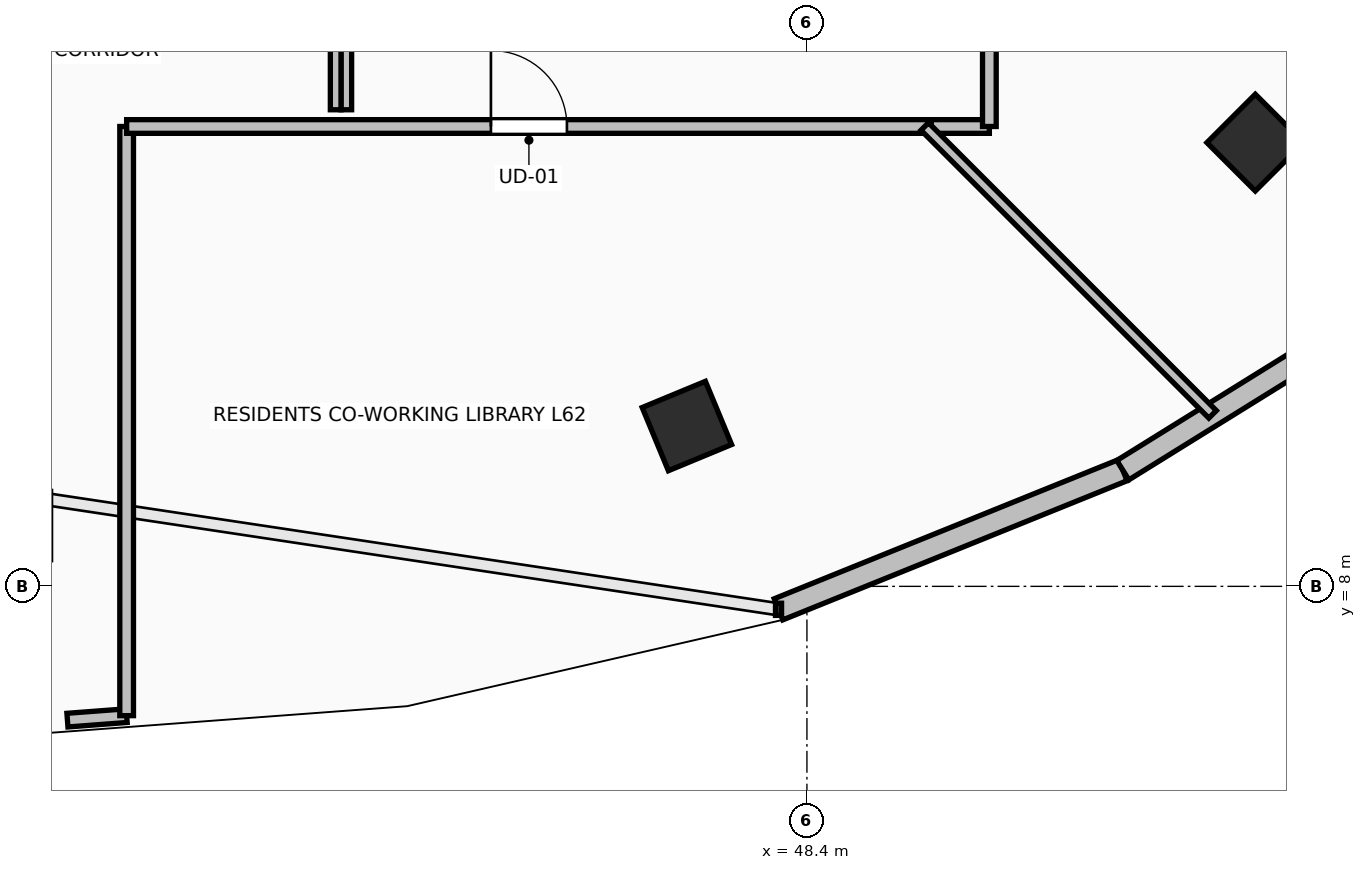
"""IFC4 building model, lengths in metres.
Left out: names, types, materials, properties, quantities, classifications, styles, units other than length and angle.
Written with IfcOpenShell. Run it as: python <this file> out.ifc"""

import sys

from ifc_helpers import new_model, si_unit, direction, frame, frame_2d, origin, origin_2d, place, context, subcontext, project, spatial, rectangle, extrude, element, fill, save


model = new_model("IFC4")
c1 = context("Model", 3, precision=1e-05, world=origin(), true_north=direction((0.0, 1.0)))
c2 = subcontext(c1, "Body", "Model", "MODEL_VIEW")
j1 = project(units=[si_unit("LENGTHUNIT", "METRE"), si_unit("PLANEANGLEUNIT", "RADIAN")], contexts=[c1])
p1 = place(None, origin())
s1 = spatial("IfcSite", under=j1, at=p1, CompositionType="ELEMENT")
p2 = place(p1, origin())
s2 = spatial("IfcBuilding", under=s1, at=p2, CompositionType="ELEMENT")
p3 = place(p2, frame((0.0, 0.0, 229.75)))
s3 = spatial("IfcBuildingStorey", under=s2, at=p3, CompositionType="ELEMENT", Elevation=229.75)
for number, where, z_axis, x_axis in (
    (1, (46.821, 10.109, 0.0), (0.0, 0.0, 1.0), (0.383, -0.924, 0.0)),
    (2, (54.299, 13.838, 0.0), (0.0, 0.0, 1.0), (0.707, -0.707, 0.0)),
):
    element("IfcColumn", number, at=place(p3, frame(where, z_axis=z_axis, x_axis=x_axis)), inside=s3, PredefinedType="COLUMN", context=c2, shape_type="SweptSolid", body=[
        extrude(rectangle(XDim=0.9, YDim=0.9, at=origin_2d()), origin(), (0.0, 0.0, 1.0), 4.5),
    ])
p4 = place(p3, frame((48.026, 7.698, 0.0), z_axis=(0.0, 0.0, 1.0), x_axis=(0.927147375511, 0.374696869594, 0.0)))
e3 = element("IfcWall", 3, at=p4, inside=s3, PredefinedType="STANDARD", context=c2, shape_type="SweptSolid", body=[
    extrude(rectangle(XDim=4.885, YDim=0.3, at=frame_2d((2.443, 0.0))), origin(), (0.0, 0.0, 1.0), 4.24),
])
p5 = place(p3, frame((52.556, 9.529, 0.0), z_axis=(0.0, 0.0, 1.0), x_axis=(0.849702323036, 0.527262707032, 0.0)))
e4 = element("IfcWall", 4, at=p5, inside=s3, PredefinedType="STANDARD", context=c2, shape_type="SweptSolid", body=[
    extrude(rectangle(XDim=4.672, YDim=0.3, at=frame_2d((2.336, 0.0))), origin(), (0.0, 0.0, 1.0), 4.24),
])
p6 = place(p3, frame((38.671, 6.24, 0.0), z_axis=(0.0, 0.0, 1.0), x_axis=(0.997136622012, 0.0756211415, 0.0)))
e5 = element("IfcWall", 5, at=p6, inside=s3, PredefinedType="PARTITIONING", context=c2, shape_type="SweptSolid", body=[
    extrude(rectangle(XDim=0.781, YDim=0.18, at=frame_2d((0.391, 0.0))), origin(), (0.0, 0.0, 1.0), 4.24),
])
p7 = place(p3, frame((39.45, 6.299, 0.0), z_axis=(0.0, 0.0, 1.0), x_axis=(0.0, 1.0, 0.0)))
e6 = element("IfcWall", 6, at=p7, inside=s3, PredefinedType="PARTITIONING", context=c2, shape_type="SweptSolid", body=[
    extrude(rectangle(XDim=7.751, YDim=0.18, at=frame_2d((3.875, 0.0))), origin(), (0.0, 0.0, 1.0), 3.432),
])
p8 = place(p3, frame((39.45, 14.05, 0.0), z_axis=(0.0, 0.0, 1.0), x_axis=(1.0, 0.0, 0.0)))
e7 = element("IfcWall", 7, at=p8, inside=s3, PredefinedType="PARTITIONING", context=c2, shape_type="SweptSolid", body=[
    extrude(rectangle(XDim=10.585, YDim=0.18, at=frame_2d((5.292, 0.0))), origin(), (0.0, 0.0, 1.0), 3.432),
])
p9 = place(p8, frame((4.792, 0.0, 0.0)))
e8 = element("IfcOpeningElement", 8, at=p9, cuts=e7, PredefinedType="OPENING", context=c2, shape_type="SweptSolid", body=[
    extrude(rectangle(XDim=1.0, YDim=2.15, at=frame_2d((0.5, 1.075))), frame((0.0, 0.105, 0.0), z_axis=(0.0, -1.0, 0.0), x_axis=(1.0, 0.0, 0.0)), (0.0, 0.0, 1.0), 0.21),
])
p10 = place(p3, frame((50.035, 14.05, 0.0), z_axis=(0.0, 0.0, 1.0), x_axis=(1.0, 0.0, 0.0)))
e9 = element("IfcWall", 9, at=p10, inside=s3, PredefinedType="PARTITIONING", context=c2, shape_type="SweptSolid", body=[
    extrude(rectangle(XDim=0.765, YDim=0.18, at=frame_2d((0.383, 0.0))), origin(), (0.0, 0.0, 1.0), 3.886),
])
p11 = place(p3, frame((50.8, 14.05, 0.0), z_axis=(0.0, 0.0, 1.0), x_axis=(0.0, 1.0, 0.0)))
e10 = element("IfcWall", 10, at=p11, inside=s3, PredefinedType="PARTITIONING", context=c2, shape_type="SweptSolid", body=[
    extrude(rectangle(XDim=12.01, YDim=0.18, at=frame_2d((6.005, 0.0))), origin(), (0.0, 0.0, 1.0), 3.432),
])
p12 = place(p11, frame((5.505, 0.0, 0.0)))
e11 = element("IfcOpeningElement", 11, at=p12, cuts=e10, PredefinedType="OPENING", context=c2, shape_type="SweptSolid", body=[
    extrude(rectangle(XDim=1.0, YDim=2.15, at=frame_2d((0.5, 1.075))), frame((0.0, 0.105, 0.0), z_axis=(0.0, -1.0, 0.0), x_axis=(1.0, 0.0, 0.0)), (0.0, 0.0, 1.0), 0.21),
])
p13 = place(p3, frame((53.737, 10.263, 0.0), z_axis=(0.0, 0.0, 1.0), x_axis=(-0.707106781187, 0.707106781187, 0.0)))
e12 = element("IfcWall", 12, at=p13, inside=s3, PredefinedType="PARTITIONING", context=c2, shape_type="SweptSolid", body=[
    extrude(rectangle(XDim=5.356, YDim=0.14, at=frame_2d((2.678, 0.0))), origin(), (0.0, 0.0, 1.0), 3.774),
])
for number, where, z_axis, x_axis in (
    (13, (42.34, 14.27, 0.0), (0.0, 0.0, 1.0), (0.0, 1.0, 0.0)),
    (14, (42.2, 16.1, 0.0), (0.0, 0.0, 1.0), (0.0, -1.0, 0.0)),
):
    element("IfcWall", number, at=place(p3, frame(where, z_axis=z_axis, x_axis=x_axis)), inside=s3, PredefinedType="PARTITIONING", context=c2, shape_type="SweptSolid", body=[
        extrude(rectangle(XDim=1.83, YDim=0.14, at=frame_2d((0.915, 0.0))), origin(), (0.0, 0.0, 1.0), 3.929),
    ])
p14 = place(p9, origin())
e15 = element("IfcDoor", 15, at=p14, inside=s3, OperationType="SINGLE_SWING_LEFT", PredefinedType="DOOR", context=c2, shape_type="SweptSolid", body=[
    extrude(rectangle(XDim=1.0, YDim=2.15, at=frame_2d((0.5, 1.075))), frame((0.0, 0.025, 0.0), z_axis=(0.0, -1.0, 0.0), x_axis=(1.0, 0.0, 0.0)), (0.0, 0.0, 1.0), 0.05),
])
fill(e8, e15)
save(model, sys.argv[1])
